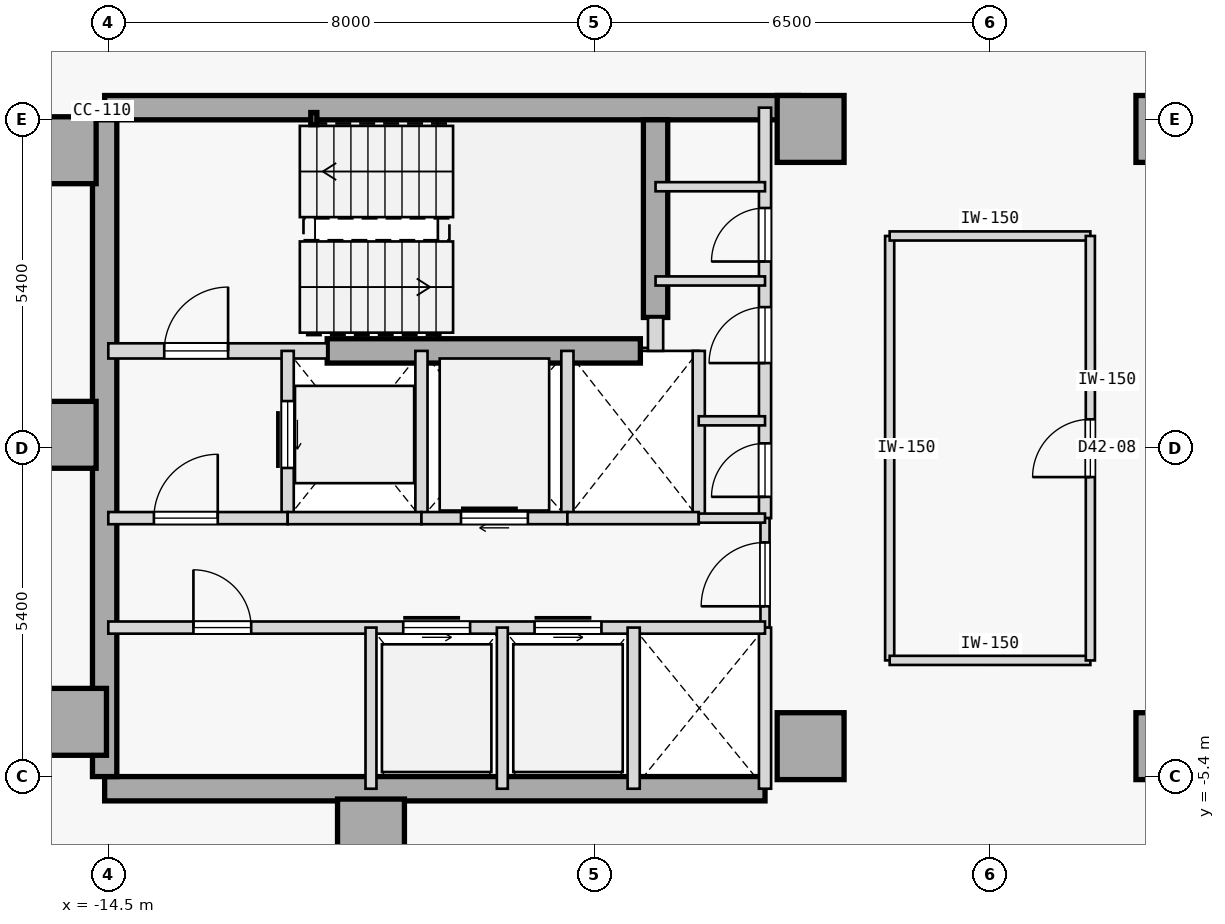
"""IFC4 building model, lengths in metres.
Left out: names, types, materials, properties, quantities, classifications, styles, units other than length and angle.
Written with IfcOpenShell. Run it as: python <this file> out.ifc"""

import sys

from ifc_helpers import new_model, si_unit, direction, frame, frame_2d, origin, origin_2d, place, context, subcontext, project, spatial, rectangle, hollow_rectangle, extrude, element, fill, save


model = new_model("IFC4")
c1 = context("Model", 3, precision=1e-05, world=origin(), true_north=direction((0.0, 1.0)))
c2 = subcontext(c1, "Body", "Model", "MODEL_VIEW")
j1 = project(units=[si_unit("LENGTHUNIT", "METRE"), si_unit("PLANEANGLEUNIT", "RADIAN")], contexts=[c1])
p1 = place(None, origin())
s1 = spatial("IfcSite", under=j1, at=p1, CompositionType="ELEMENT")
p2 = place(p1, origin())
s2 = spatial("IfcBuilding", under=s1, at=p2, CompositionType="ELEMENT")
p3 = place(p2, frame((0.0, 0.0, 165.0)))
s3 = spatial("IfcBuildingStorey", under=s2, at=p3, CompositionType="ELEMENT", Elevation=165.0)
for number, where, z_axis, x_axis in (
    (1, (-15.25, 4.9, 0.0), (0.0, 0.0, 1.0), (1.0, 0.0, 0.0)),
    (2, (-15.25, 0.22, 0.0), (0.0, 0.0, 1.0), (1.0, 0.0, 0.0)),
    (3, (-15.08, -4.5, 0.0), (0.0, 0.0, 1.0), (1.0, 0.0, 0.0)),
    (4, (-10.18, -6.32, 0.0), (0.0, 0.0, 1.0), (1.0, 0.0, 0.0)),
    (5, (-2.95, -4.9, 0.0), (0.0, 0.0, 1.0), (1.0, 0.0, 0.0)),
    (6, (-2.95, 5.25, 0.0), (0.0, 0.0, 1.0), (1.0, 0.0, 0.0)),
    (7, (2.95, -4.9, 0.0), (0.0, 0.0, 1.0), (1.0, 0.0, 0.0)),
    (8, (2.95, 5.25, 0.0), (0.0, 0.0, 1.0), (1.0, 0.0, 0.0)),
):
    element("IfcColumn", number, at=place(p3, frame(where, z_axis=z_axis, x_axis=x_axis)), inside=s3, PredefinedType="COLUMN", context=c2, shape_type="SweptSolid", body=[
        extrude(rectangle(XDim=1.1, YDim=1.1, at=origin_2d()), origin(), (0.0, 0.0, 1.0), 3.4),
    ])
p4 = place(p3, frame((-14.56, 5.6, 0.0), z_axis=(0.0, 0.0, 1.0), x_axis=(1.0, 0.0, 0.0)))
e9 = element("IfcWall", 9, at=p4, inside=s3, PredefinedType="SHEAR", context=c2, shape_type="SweptSolid", body=[
    extrude(rectangle(XDim=11.41, YDim=0.4, at=frame_2d((5.705, 0.0))), origin(), (0.0, 0.0, 1.0), 3.175),
])
p5 = place(p3, frame((-14.56, -5.6, 0.0), z_axis=(0.0, 0.0, 1.0), x_axis=(1.0, 0.0, 0.0)))
e10 = element("IfcWall", 10, at=p5, inside=s3, PredefinedType="SHEAR", context=c2, shape_type="SweptSolid", body=[
    extrude(rectangle(XDim=10.86, YDim=0.4, at=frame_2d((5.43, 0.0))), origin(), (0.0, 0.0, 1.0), 3.175),
])
p6 = place(p3, frame((-14.56, -5.4, 0.0), z_axis=(0.0, 0.0, 1.0), x_axis=(0.0, 1.0, 0.0)))
e11 = element("IfcWall", 11, at=p6, inside=s3, PredefinedType="SHEAR", context=c2, shape_type="SweptSolid", body=[
    extrude(rectangle(XDim=10.8, YDim=0.4, at=frame_2d((5.4, 0.0))), origin(), (0.0, 0.0, 1.0), 3.175),
])
p7 = place(p3, frame((-5.5, 2.15, 0.0), z_axis=(0.0, 0.0, 1.0), x_axis=(0.0, 1.0, 0.0)))
e12 = element("IfcWall", 12, at=p7, inside=s3, PredefinedType="SHEAR", context=c2, shape_type="SweptSolid", body=[
    extrude(rectangle(XDim=3.25, YDim=0.4, at=frame_2d((1.625, 0.0))), origin(), (0.0, 0.0, 1.0), 3.175),
])
p8 = place(p3, frame((-10.9, 1.6, 0.0), z_axis=(0.0, 0.0, 1.0), x_axis=(1.0, 0.0, 0.0)))
e13 = element("IfcWall", 13, at=p8, inside=s3, PredefinedType="SHEAR", context=c2, shape_type="SweptSolid", body=[
    extrude(rectangle(XDim=5.15, YDim=0.4, at=frame_2d((2.575, 0.0))), origin(), (0.0, 0.0, 1.0), 3.175),
])
p9 = place(p3, frame((-11.12, 5.42, 0.0), z_axis=(0.0, 0.0, 1.0), x_axis=(1.0, 0.0, 0.0)))
e14 = element("IfcColumn", 14, at=p9, inside=s3, PredefinedType="COLUMN", context=c2, shape_type="SweptSolid", body=[
    extrude(hollow_rectangle(XDim=0.1, YDim=0.2, WallThickness=0.008, at=origin_2d()), origin(), (0.0, 0.0, 1.0), 3.4),
])
p10 = place(p3, frame((-14.5, 1.6, 0.0), z_axis=(0.0, 0.0, 1.0), x_axis=(1.0, 0.0, 0.0)))
e15 = element("IfcWall", 15, at=p10, inside=s3, PredefinedType="STANDARD", context=c2, shape_type="SweptSolid", body=[
    extrude(rectangle(XDim=3.6, YDim=0.25, at=frame_2d((1.8, 0.0))), origin(), (0.0, 0.0, 1.0), 3.175),
])
p11 = place(p10, frame((0.92, 0.0, 0.0)))
e16 = element("IfcOpeningElement", 16, at=p11, cuts=e15, PredefinedType="OPENING", context=c2, shape_type="SweptSolid", body=[
    extrude(rectangle(XDim=1.05, YDim=2.15, at=frame_2d((0.525, 1.075))), frame((0.0, 0.135, 0.0), z_axis=(0.0, -1.0, 0.0), x_axis=(1.0, 0.0, 0.0)), (0.0, 0.0, 1.0), 0.27),
])
p12 = place(p3, frame((-5.5, 1.6, 0.0), z_axis=(0.0, 0.0, 1.0), x_axis=(0.0, 1.0, 0.0)))
e17 = element("IfcWall", 17, at=p12, inside=s3, PredefinedType="STANDARD", context=c2, shape_type="SweptSolid", body=[
    extrude(rectangle(XDim=0.55, YDim=0.25, at=frame_2d((0.275, 0.0))), origin(), (0.0, 0.0, 1.0), 3.175),
])
p13 = place(p3, frame((-3.7, -1.15, 0.0), z_axis=(0.0, 0.0, 1.0), x_axis=(0.0, 1.0, 0.0)))
e18 = element("IfcWall", 18, at=p13, inside=s3, PredefinedType="STANDARD", context=c2, shape_type="SweptSolid", body=[
    extrude(rectangle(XDim=6.75, YDim=0.2, at=frame_2d((3.375, 0.0))), origin(), (0.0, 0.0, 1.0), 3.175),
])
p14 = place(p13, frame((0.35, 0.0, 0.0)))
e19 = element("IfcOpeningElement", 19, at=p14, cuts=e18, PredefinedType="OPENING", context=c2, shape_type="SweptSolid", body=[
    extrude(rectangle(XDim=0.88, YDim=2.15, at=frame_2d((0.44, 1.075))), frame((0.0, 0.11, 0.0), z_axis=(0.0, -1.0, 0.0), x_axis=(1.0, 0.0, 0.0)), (0.0, 0.0, 1.0), 0.22),
])
p15 = place(p13, frame((2.55, 0.0, 0.0)))
e20 = element("IfcOpeningElement", 20, at=p15, cuts=e18, PredefinedType="OPENING", context=c2, shape_type="SweptSolid", body=[
    extrude(rectangle(XDim=0.92, YDim=2.15, at=frame_2d((0.46, 1.075))), frame((0.0, 0.11, 0.0), z_axis=(0.0, -1.0, 0.0), x_axis=(1.0, 0.0, 0.0)), (0.0, 0.0, 1.0), 0.22),
])
p16 = place(p13, frame((4.22, 0.0, 0.0)))
e21 = element("IfcOpeningElement", 21, at=p16, cuts=e18, PredefinedType="OPENING", context=c2, shape_type="SweptSolid", body=[
    extrude(rectangle(XDim=0.88, YDim=2.15, at=frame_2d((0.44, 1.075))), frame((0.0, 0.11, 0.0), z_axis=(0.0, -1.0, 0.0), x_axis=(1.0, 0.0, 0.0)), (0.0, 0.0, 1.0), 0.22),
])
p17 = place(p3, frame((-3.7, -2.95, 0.0), z_axis=(0.0, 0.0, 1.0), x_axis=(0.0, 1.0, 0.0)))
e22 = element("IfcWall", 22, at=p17, inside=s3, PredefinedType="PARTITIONING", context=c2, shape_type="SweptSolid", body=[
    extrude(rectangle(XDim=1.8, YDim=0.15, at=frame_2d((0.9, 0.0))), origin(), (0.0, 0.0, 1.0), 3.175),
])
p18 = place(p17, frame((0.35, 0.0, 0.0)))
e23 = element("IfcOpeningElement", 23, at=p18, cuts=e22, PredefinedType="OPENING", context=c2, shape_type="SweptSolid", body=[
    extrude(rectangle(XDim=1.05, YDim=2.18, at=frame_2d((0.525, 1.09))), frame((0.0, 0.085, 0.0), z_axis=(0.0, -1.0, 0.0), x_axis=(1.0, 0.0, 0.0)), (0.0, 0.0, 1.0), 0.17),
])
p19 = place(p3, frame((-3.7, -5.6, 0.0), z_axis=(0.0, 0.0, 1.0), x_axis=(0.0, 1.0, 0.0)))
e24 = element("IfcWall", 24, at=p19, inside=s3, PredefinedType="STANDARD", context=c2, shape_type="SweptSolid", body=[
    extrude(rectangle(XDim=2.65, YDim=0.2, at=frame_2d((1.325, 0.0))), origin(), (0.0, 0.0, 1.0), 3.175),
])
p20 = place(p3, frame((-11.55, -1.15, 0.0), z_axis=(0.0, 0.0, 1.0), x_axis=(0.0, 1.0, 0.0)))
e25 = element("IfcWall", 25, at=p20, inside=s3, PredefinedType="STANDARD", context=c2, shape_type="SweptSolid", body=[
    extrude(rectangle(XDim=2.75, YDim=0.2, at=frame_2d((1.375, 0.0))), origin(), (0.0, 0.0, 1.0), 3.175),
])
p21 = place(p20, frame((0.825, 0.0, 0.0)))
e26 = element("IfcOpeningElement", 26, at=p21, cuts=e25, PredefinedType="OPENING", context=c2, shape_type="SweptSolid", body=[
    extrude(rectangle(XDim=1.1, YDim=2.15, at=frame_2d((0.55, 1.075))), frame((0.0, 0.11, 0.0), z_axis=(0.0, -1.0, 0.0), x_axis=(1.0, 0.0, 0.0)), (0.0, 0.0, 1.0), 0.22),
])
p22 = place(p3, frame((-9.35, -1.15, 0.0), z_axis=(0.0, 0.0, 1.0), x_axis=(0.0, 1.0, 0.0)))
e27 = element("IfcWall", 27, at=p22, inside=s3, PredefinedType="STANDARD", context=c2, shape_type="SweptSolid", body=[
    extrude(rectangle(XDim=2.75, YDim=0.2, at=frame_2d((1.375, 0.0))), origin(), (0.0, 0.0, 1.0), 3.175),
])
p23 = place(p3, frame((-14.5, -1.15, 0.0), z_axis=(0.0, 0.0, 1.0), x_axis=(1.0, 0.0, 0.0)))
e28 = element("IfcWall", 28, at=p23, inside=s3, PredefinedType="STANDARD", context=c2, shape_type="SweptSolid", body=[
    extrude(rectangle(XDim=2.95, YDim=0.2, at=frame_2d((1.475, 0.0))), origin(), (0.0, 0.0, 1.0), 3.175),
])
p24 = place(p23, frame((0.75, 0.0, 0.0)))
e29 = element("IfcOpeningElement", 29, at=p24, cuts=e28, PredefinedType="OPENING", context=c2, shape_type="SweptSolid", body=[
    extrude(rectangle(XDim=1.05, YDim=2.18, at=frame_2d((0.525, 1.09))), frame((0.0, 0.11, 0.0), z_axis=(0.0, -1.0, 0.0), x_axis=(1.0, 0.0, 0.0)), (0.0, 0.0, 1.0), 0.22),
])
p25 = place(p3, frame((-11.55, -1.15, 0.0), z_axis=(0.0, 0.0, 1.0), x_axis=(1.0, 0.0, 0.0)))
e30 = element("IfcWall", 30, at=p25, inside=s3, PredefinedType="STANDARD", context=c2, shape_type="SweptSolid", body=[
    extrude(rectangle(XDim=2.2, YDim=0.2, at=frame_2d((1.1, 0.0))), origin(), (0.0, 0.0, 1.0), 3.175),
])
p26 = place(p3, frame((-6.95, -1.15, 0.0), z_axis=(0.0, 0.0, 1.0), x_axis=(0.0, 1.0, 0.0)))
e31 = element("IfcWall", 31, at=p26, inside=s3, PredefinedType="STANDARD", context=c2, shape_type="SweptSolid", body=[
    extrude(rectangle(XDim=2.75, YDim=0.2, at=frame_2d((1.375, 0.0))), origin(), (0.0, 0.0, 1.0), 3.175),
])
p27 = place(p3, frame((-9.35, -1.15, 0.0), z_axis=(0.0, 0.0, 1.0), x_axis=(1.0, 0.0, 0.0)))
e32 = element("IfcWall", 32, at=p27, inside=s3, PredefinedType="STANDARD", context=c2, shape_type="SweptSolid", body=[
    extrude(rectangle(XDim=2.4, YDim=0.2, at=frame_2d((1.2, 0.0))), origin(), (0.0, 0.0, 1.0), 3.175),
])
p28 = place(p27, frame((0.65, 0.0, 0.0)))
e33 = element("IfcOpeningElement", 33, at=p28, cuts=e32, PredefinedType="OPENING", context=c2, shape_type="SweptSolid", body=[
    extrude(rectangle(XDim=1.1, YDim=2.15, at=frame_2d((0.55, 1.075))), frame((0.0, 0.11, 0.0), z_axis=(0.0, -1.0, 0.0), x_axis=(1.0, 0.0, 0.0)), (0.0, 0.0, 1.0), 0.22),
])
p29 = place(p3, frame((-4.79, -1.15, 0.0), z_axis=(0.0, 0.0, 1.0), x_axis=(0.0, 1.0, 0.0)))
e34 = element("IfcWall", 34, at=p29, inside=s3, PredefinedType="STANDARD", context=c2, shape_type="SweptSolid", body=[
    extrude(rectangle(XDim=2.75, YDim=0.2, at=frame_2d((1.375, 0.0))), origin(), (0.0, 0.0, 1.0), 3.175),
])
p30 = place(p3, frame((-6.95, -1.15, 0.0), z_axis=(0.0, 0.0, 1.0), x_axis=(1.0, 0.0, 0.0)))
e35 = element("IfcWall", 35, at=p30, inside=s3, PredefinedType="STANDARD", context=c2, shape_type="SweptSolid", body=[
    extrude(rectangle(XDim=2.16, YDim=0.2, at=frame_2d((1.08, 0.0))), origin(), (0.0, 0.0, 1.0), 3.175),
])
p31 = place(p3, frame((-4.79, -1.15, 0.0), z_axis=(0.0, 0.0, 1.0), x_axis=(1.0, 0.0, 0.0)))
e36 = element("IfcWall", 36, at=p31, inside=s3, PredefinedType="PARTITIONING", context=c2, shape_type="SweptSolid", body=[
    extrude(rectangle(XDim=1.09, YDim=0.15, at=frame_2d((0.545, 0.0))), origin(), (0.0, 0.0, 1.0), 3.175),
])
p32 = place(p3, frame((-14.5, -2.95, 0.0), z_axis=(0.0, 0.0, 1.0), x_axis=(1.0, 0.0, 0.0)))
e37 = element("IfcWall", 37, at=p32, inside=s3, PredefinedType="STANDARD", context=c2, shape_type="SweptSolid", body=[
    extrude(rectangle(XDim=10.8, YDim=0.2, at=frame_2d((5.4, 0.0))), origin(), (0.0, 0.0, 1.0), 3.175),
])
p33 = place(p32, frame((4.85, 0.0, 0.0)))
e38 = element("IfcOpeningElement", 38, at=p33, cuts=e37, PredefinedType="OPENING", context=c2, shape_type="SweptSolid", body=[
    extrude(rectangle(XDim=1.1, YDim=2.15, at=frame_2d((0.55, 1.075))), frame((0.0, 0.11, 0.0), z_axis=(0.0, -1.0, 0.0), x_axis=(1.0, 0.0, 0.0)), (0.0, 0.0, 1.0), 0.22),
])
p34 = place(p32, frame((7.01, 0.0, 0.0)))
e39 = element("IfcOpeningElement", 39, at=p34, cuts=e37, PredefinedType="OPENING", context=c2, shape_type="SweptSolid", body=[
    extrude(rectangle(XDim=1.1, YDim=2.15, at=frame_2d((0.55, 1.075))), frame((0.0, 0.11, 0.0), z_axis=(0.0, -1.0, 0.0), x_axis=(1.0, 0.0, 0.0)), (0.0, 0.0, 1.0), 0.22),
])
p35 = place(p32, frame((1.4, 0.0, 0.0)))
e40 = element("IfcOpeningElement", 40, at=p35, cuts=e37, PredefinedType="OPENING", context=c2, shape_type="SweptSolid", body=[
    extrude(rectangle(XDim=0.95, YDim=2.15, at=frame_2d((0.475, 1.075))), frame((0.0, 0.11, 0.0), z_axis=(0.0, -1.0, 0.0), x_axis=(1.0, 0.0, 0.0)), (0.0, 0.0, 1.0), 0.22),
])
p36 = place(p3, frame((-5.86, -5.6, 0.0), z_axis=(0.0, 0.0, 1.0), x_axis=(0.0, 1.0, 0.0)))
e41 = element("IfcWall", 41, at=p36, inside=s3, PredefinedType="STANDARD", context=c2, shape_type="SweptSolid", body=[
    extrude(rectangle(XDim=2.65, YDim=0.2, at=frame_2d((1.325, 0.0))), origin(), (0.0, 0.0, 1.0), 3.175),
])
for number, where, z_axis, x_axis in (
    (42, (-10.18, -5.6, 0.0), (0.0, 0.0, 1.0), (0.0, 1.0, 0.0)),
    (43, (-8.02, -5.6, 0.0), (0.0, 0.0, 1.0), (0.0, 1.0, 0.0)),
):
    element("IfcWall", number, at=place(p3, frame(where, z_axis=z_axis, x_axis=x_axis)), inside=s3, PredefinedType="STANDARD", context=c2, shape_type="SweptSolid", body=[
        extrude(rectangle(XDim=2.65, YDim=0.18, at=frame_2d((1.325, 0.0))), origin(), (0.0, 0.0, 1.0), 3.175),
    ])
p37 = place(p3, frame((-5.5, 4.3, 0.0), z_axis=(0.0, 0.0, 1.0), x_axis=(1.0, 0.0, 0.0)))
e44 = element("IfcWall", 44, at=p37, inside=s3, PredefinedType="PARTITIONING", context=c2, shape_type="SweptSolid", body=[
    extrude(rectangle(XDim=1.8, YDim=0.15, at=frame_2d((0.9, 0.0))), origin(), (0.0, 0.0, 1.0), 3.175),
])
p38 = place(p3, frame((-4.79, 0.45, 0.0), z_axis=(0.0, 0.0, 1.0), x_axis=(1.0, 0.0, 0.0)))
e45 = element("IfcWall", 45, at=p38, inside=s3, PredefinedType="PARTITIONING", context=c2, shape_type="SweptSolid", body=[
    extrude(rectangle(XDim=1.09, YDim=0.15, at=frame_2d((0.545, 0.0))), origin(), (0.0, 0.0, 1.0), 3.175),
])
p39 = place(p3, frame((-5.5, 2.75, 0.0), z_axis=(0.0, 0.0, 1.0), x_axis=(1.0, 0.0, 0.0)))
e46 = element("IfcWall", 46, at=p39, inside=s3, PredefinedType="PARTITIONING", context=c2, shape_type="SweptSolid", body=[
    extrude(rectangle(XDim=1.8, YDim=0.15, at=frame_2d((0.9, 0.0))), origin(), (0.0, 0.0, 1.0), 3.175),
])
p40 = place(p3, frame((-1.65, -3.49, 0.0), z_axis=(0.0, 0.0, 1.0), x_axis=(-3.4979712e-05, 0.999999999388, 0.0)))
e47 = element("IfcWall", 47, at=p40, inside=s3, PredefinedType="PARTITIONING", context=c2, shape_type="SweptSolid", body=[
    extrude(rectangle(XDim=6.979, YDim=0.15, at=frame_2d((3.49, 0.0))), origin(), (0.0, 0.0, 1.0), 3.175),
])
p41 = place(p3, frame((-1.65, -3.49, 0.0), z_axis=(0.0, 0.0, 1.0), x_axis=(0.999999975374, -0.000221926315, 0.0)))
e48 = element("IfcWall", 48, at=p41, inside=s3, PredefinedType="PARTITIONING", context=c2, shape_type="SweptSolid", body=[
    extrude(rectangle(XDim=3.3, YDim=0.15, at=frame_2d((1.65, 0.0))), origin(), (0.0, 0.0, 1.0), 3.175),
])
p42 = place(p3, frame((-1.65, 3.49, 0.0), z_axis=(0.0, 0.0, 1.0), x_axis=(1.0, 0.0, 0.0)))
e49 = element("IfcWall", 49, at=p42, inside=s3, PredefinedType="PARTITIONING", context=c2, shape_type="SweptSolid", body=[
    extrude(rectangle(XDim=3.3, YDim=0.15, at=frame_2d((1.65, 0.0))), origin(), (0.0, 0.0, 1.0), 3.175),
])
p43 = place(p3, frame((1.65, -3.49, 0.0), z_axis=(0.0, 0.0, 1.0), x_axis=(-6.9952083e-05, 0.999999997553, 0.0)))
e50 = element("IfcWall", 50, at=p43, inside=s3, PredefinedType="PARTITIONING", context=c2, shape_type="SweptSolid", body=[
    extrude(rectangle(XDim=6.98, YDim=0.15, at=frame_2d((3.49, 0.0))), origin(), (0.0, 0.0, 1.0), 3.175),
])
p44 = place(p43, frame((3.015, 0.0, 0.0)))
e51 = element("IfcOpeningElement", 51, at=p44, cuts=e50, PredefinedType="OPENING", context=c2, shape_type="SweptSolid", body=[
    extrude(rectangle(XDim=0.95, YDim=2.15, at=frame_2d((0.475, 1.075))), frame((0.0, 0.085, 0.0), z_axis=(0.0, -1.0, 0.0), x_axis=(1.0, 0.0, 0.0)), (0.0, 0.0, 1.0), 0.17),
])
p45 = place(p11, origin())
e52 = element("IfcDoor", 52, at=p45, inside=s3, OperationType="SINGLE_SWING_RIGHT", PredefinedType="DOOR", context=c2, shape_type="SweptSolid", body=[
    extrude(rectangle(XDim=1.05, YDim=2.15, at=frame_2d((0.525, 1.075))), frame((0.0, 0.025, 0.0), z_axis=(0.0, -1.0, 0.0), x_axis=(1.0, 0.0, 0.0)), (0.0, 0.0, 1.0), 0.05),
])
fill(e16, e52)
p46 = place(p24, origin())
e53 = element("IfcDoor", 53, at=p46, inside=s3, OperationType="SINGLE_SWING_RIGHT", PredefinedType="DOOR", context=c2, shape_type="SweptSolid", body=[
    extrude(rectangle(XDim=1.05, YDim=2.18, at=frame_2d((0.525, 1.09))), frame((0.0, 0.025, 0.0), z_axis=(0.0, -1.0, 0.0), x_axis=(1.0, 0.0, 0.0)), (0.0, 0.0, 1.0), 0.05),
])
fill(e29, e53)
p47 = place(p18, origin())
e54 = element("IfcDoor", 54, at=p47, inside=s3, OperationType="SINGLE_SWING_LEFT", PredefinedType="DOOR", context=c2, shape_type="SweptSolid", body=[
    extrude(rectangle(XDim=1.05, YDim=2.18, at=frame_2d((0.525, 1.09))), frame((0.0, 0.025, 0.0), z_axis=(0.0, -1.0, 0.0), x_axis=(1.0, 0.0, 0.0)), (0.0, 0.0, 1.0), 0.05),
])
fill(e23, e54)
p48 = place(p21, origin())
e55 = element("IfcDoor", 55, at=p48, inside=s3, OperationType="SLIDING_TO_RIGHT", PredefinedType="DOOR", context=c2, shape_type="SweptSolid", body=[
    extrude(rectangle(XDim=1.1, YDim=2.15, at=frame_2d((0.55, 1.075))), frame((0.0, 0.025, 0.0), z_axis=(0.0, -1.0, 0.0), x_axis=(1.0, 0.0, 0.0)), (0.0, 0.0, 1.0), 0.05),
])
fill(e26, e55)
p49 = place(p28, origin())
e56 = element("IfcDoor", 56, at=p49, inside=s3, OperationType="SLIDING_TO_RIGHT", PredefinedType="DOOR", context=c2, shape_type="SweptSolid", body=[
    extrude(rectangle(XDim=1.1, YDim=2.15, at=frame_2d((0.55, 1.075))), frame((0.0, 0.025, 0.0), z_axis=(0.0, -1.0, 0.0), x_axis=(1.0, 0.0, 0.0)), (0.0, 0.0, 1.0), 0.05),
])
fill(e33, e56)
p50 = place(p33, origin())
e57 = element("IfcDoor", 57, at=p50, inside=s3, OperationType="SLIDING_TO_LEFT", PredefinedType="DOOR", context=c2, shape_type="SweptSolid", body=[
    extrude(rectangle(XDim=1.1, YDim=2.15, at=frame_2d((0.55, 1.075))), frame((0.0, 0.025, 0.0), z_axis=(0.0, -1.0, 0.0), x_axis=(1.0, 0.0, 0.0)), (0.0, 0.0, 1.0), 0.05),
])
fill(e38, e57)
p51 = place(p34, origin())
e58 = element("IfcDoor", 58, at=p51, inside=s3, OperationType="SLIDING_TO_LEFT", PredefinedType="DOOR", context=c2, shape_type="SweptSolid", body=[
    extrude(rectangle(XDim=1.1, YDim=2.15, at=frame_2d((0.55, 1.075))), frame((0.0, 0.025, 0.0), z_axis=(0.0, -1.0, 0.0), x_axis=(1.0, 0.0, 0.0)), (0.0, 0.0, 1.0), 0.05),
])
fill(e39, e58)
p52 = place(p35, origin())
e59 = element("IfcDoor", 59, at=p52, inside=s3, OperationType="SINGLE_SWING_LEFT", PredefinedType="DOOR", context=c2, shape_type="SweptSolid", body=[
    extrude(rectangle(XDim=0.95, YDim=2.15, at=frame_2d((0.475, 1.075))), frame((0.0, 0.025, 0.0), z_axis=(0.0, -1.0, 0.0), x_axis=(1.0, 0.0, 0.0)), (0.0, 0.0, 1.0), 0.05),
])
fill(e40, e59)
p53 = place(p14, origin())
e60 = element("IfcDoor", 60, at=p53, inside=s3, OperationType="SINGLE_SWING_LEFT", PredefinedType="DOOR", context=c2, shape_type="SweptSolid", body=[
    extrude(rectangle(XDim=0.88, YDim=2.15, at=frame_2d((0.44, 1.075))), frame((0.0, 0.025, 0.0), z_axis=(0.0, -1.0, 0.0), x_axis=(1.0, 0.0, 0.0)), (0.0, 0.0, 1.0), 0.05),
])
fill(e19, e60)
p54 = place(p15, origin())
e61 = element("IfcDoor", 61, at=p54, inside=s3, OperationType="SINGLE_SWING_LEFT", PredefinedType="DOOR", context=c2, shape_type="SweptSolid", body=[
    extrude(rectangle(XDim=0.92, YDim=2.15, at=frame_2d((0.46, 1.075))), frame((0.0, 0.025, 0.0), z_axis=(0.0, -1.0, 0.0), x_axis=(1.0, 0.0, 0.0)), (0.0, 0.0, 1.0), 0.05),
])
fill(e20, e61)
p55 = place(p16, origin())
e62 = element("IfcDoor", 62, at=p55, inside=s3, OperationType="SINGLE_SWING_LEFT", PredefinedType="DOOR", context=c2, shape_type="SweptSolid", body=[
    extrude(rectangle(XDim=0.88, YDim=2.15, at=frame_2d((0.44, 1.075))), frame((0.0, 0.025, 0.0), z_axis=(0.0, -1.0, 0.0), x_axis=(1.0, 0.0, 0.0)), (0.0, 0.0, 1.0), 0.05),
])
fill(e21, e62)
p56 = place(p44, origin())
e63 = element("IfcDoor", 63, at=p56, inside=s3, OperationType="SINGLE_SWING_LEFT", PredefinedType="DOOR", context=c2, shape_type="SweptSolid", body=[
    extrude(rectangle(XDim=0.95, YDim=2.15, at=frame_2d((0.475, 1.075))), frame((0.0, 0.025, 0.0), z_axis=(0.0, -1.0, 0.0), x_axis=(1.0, 0.0, 0.0)), (0.0, 0.0, 1.0), 0.05),
])
fill(e51, e63)
save(model, sys.argv[1])
